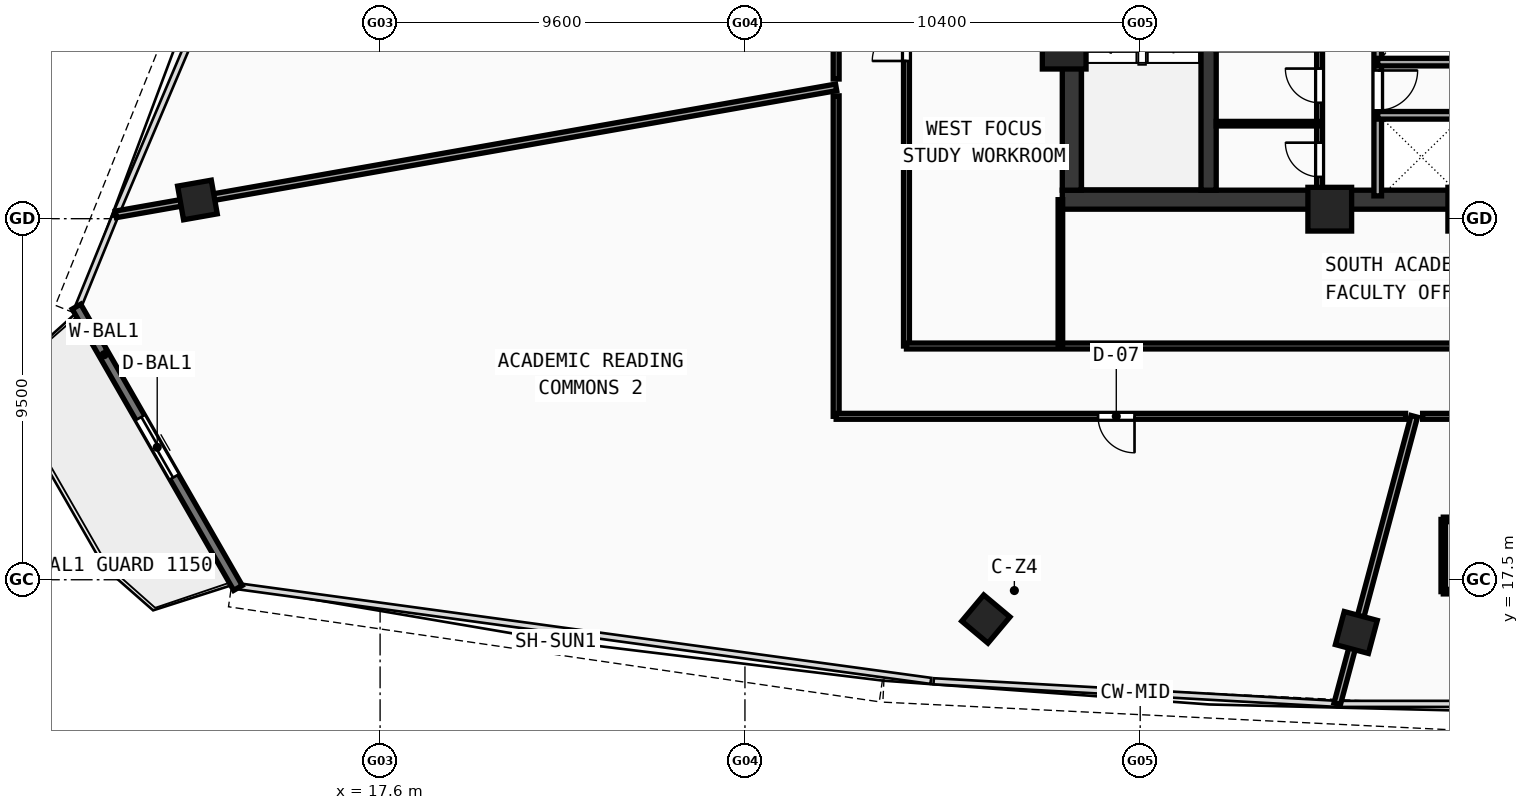
"""IFC4 building model, lengths in metres.
Left out: names, types, materials, properties, quantities, classifications, styles, units other than length and angle.
Written with IfcOpenShell. Run it as: python <this file> out.ifc"""

import sys

from ifc_helpers import new_model, si_unit, direction, frame, frame_2d, origin, origin_with_axes, origin_2d, place, context, subcontext, project, spatial, rectangle, hollow_rectangle, extrude, source, transform, mapped, element, fill, save


model = new_model("IFC4")
c1 = context("Model", 3, precision=1e-05, world=origin(), true_north=direction((0.0, 1.0)))
c2 = subcontext(c1, "Body", "Model", "MODEL_VIEW")
j1 = project(units=[si_unit("LENGTHUNIT", "METRE"), si_unit("PLANEANGLEUNIT", "RADIAN")], contexts=[c1])
p1 = place(None, origin())
s1 = spatial("IfcSite", under=j1, at=p1, CompositionType="ELEMENT")
p2 = place(p1, origin())
s2 = spatial("IfcBuilding", under=s1, at=p2, CompositionType="ELEMENT")
p3 = place(p2, frame((0.0, 0.0, 192.36)))
s3 = spatial("IfcBuildingStorey", under=s2, at=p3, CompositionType="ELEMENT", Elevation=192.36)
p4 = place(p3, frame((35.55, 27.5, 0.0), z_axis=(0.0, 0.0, 1.0), x_axis=(1.0, 0.0, 0.0)))
e1 = element("IfcWall", 1, at=p4, inside=s3, PredefinedType="SHEAR", context=c2, shape_type="SweptSolid", body=[
    extrude(rectangle(XDim=24.9, YDim=0.5, at=frame_2d((12.45, 0.0))), origin(), (0.0, 0.0, 1.0), 3.54),
])
p5 = place(p3, frame((35.8, 27.75, 0.0), z_axis=(0.0, 0.0, 1.0), x_axis=(0.0, 1.0, 0.0)))
e2 = element("IfcWall", 2, at=p5, inside=s3, PredefinedType="SHEAR", context=c2, shape_type="SweptSolid", body=[
    extrude(rectangle(XDim=12.2, YDim=0.5, at=frame_2d((6.1, 0.0))), origin(), (0.0, 0.0, 1.0), 3.54),
])
p6 = place(p3, frame((39.4, 27.75, 0.0), z_axis=(0.0, 0.0, 1.0), x_axis=(0.0, 1.0, 0.0)))
e3 = element("IfcWall", 3, at=p6, inside=s3, PredefinedType="SHEAR", context=c2, shape_type="SweptSolid", body=[
    extrude(rectangle(XDim=12.2, YDim=0.4, at=frame_2d((6.1, 0.0))), origin(), (0.0, 0.0, 1.0), 3.54),
])
p7 = place(p6, frame((10.0, 0.0, 0.0)))
e4 = element("IfcOpeningElement", 4, at=p7, cuts=e3, PredefinedType="OPENING", context=c2, shape_type="SweptSolid", body=[
    extrude(rectangle(XDim=1.1, YDim=2.1, at=frame_2d((0.55, 1.05))), frame((0.0, 0.21, 0.0), z_axis=(0.0, -1.0, 0.0), x_axis=(1.0, 0.0, 0.0)), (0.0, 0.0, 1.0), 0.42),
])
m1 = source(origin(), c2, "Body", "SweptSolid", [
    extrude(hollow_rectangle(XDim=1.15, YDim=1.15, WallThickness=0.048, at=origin_2d()), origin(), (0.0, 0.0, 1.0), 3.8),
])
for number, where, z_axis, x_axis in (
    (5, (42.588, 27.25, -0.26), (0.0, 0.0, 1.0), (1.0, 0.0, 0.0)),
    (6, (46.272, 27.25, -0.26), (0.0, 0.0, 1.0), (1.0, 0.0, 0.0)),
    (7, (35.6, 31.513, -0.26), (0.0, 0.0, 1.0), (1.0, 0.0, 0.0)),
):
    element("IfcColumn", number, at=place(p3, frame(where, z_axis=z_axis, x_axis=x_axis)), inside=s3, PredefinedType="COLUMN", context=c2, shape_type="MappedRepresentation", body=[
        mapped(m1, transform((0.0, 0.0, 0.0), scale=1.0)),
    ])
m2 = source(origin(), c2, "Body", "SweptSolid", [
    extrude(hollow_rectangle(XDim=0.9, YDim=0.9, WallThickness=0.036, at=origin_2d()), origin(), (0.0, 0.0, 1.0), 3.8),
])
for number, where, z_axis, x_axis in (
    (8, (33.539, 16.466, -0.26), (0.0, 0.0, 1.0), (0.766, -0.643, 0.0)),
    (9, (43.288, 16.112, -0.26), (0.0, 0.0, 1.0), (0.966, -0.259, 0.0)),
    (10, (12.793, 27.492, -0.26), (0.0, 0.0, 1.0), (0.174, -0.985, 0.0)),
):
    element("IfcColumn", number, at=place(p3, frame(where, z_axis=z_axis, x_axis=x_axis)), inside=s3, PredefinedType="COLUMN", context=c2, shape_type="MappedRepresentation", body=[
        mapped(m2, transform((0.0, 0.0, 0.0), scale=1.0)),
    ])
p8 = place(p3, frame((9.611, 24.686, 0.0), z_axis=(0.0, 0.0, 1.0), x_axis=(0.497930869929, -0.867216725376, 0.0)))
e11 = element("IfcWall", 11, at=p8, inside=s3, PredefinedType="STANDARD", context=c2, shape_type="SweptSolid", body=[
    extrude(rectangle(XDim=8.534, YDim=0.26, at=frame_2d((4.267, 0.0))), origin(), (0.0, 0.0, 1.0), 3.54),
])
p9 = place(p8, frame((3.367, 0.0, 0.0)))
e12 = element("IfcOpeningElement", 12, at=p9, cuts=e11, PredefinedType="OPENING", context=c2, shape_type="SweptSolid", body=[
    extrude(rectangle(XDim=1.8, YDim=2.15, at=frame_2d((0.9, 1.075))), frame((0.0, 0.14, 0.0), z_axis=(0.0, -1.0, 0.0), x_axis=(1.0, 0.0, 0.0)), (0.0, 0.0, 1.0), 0.28),
])
p10 = place(p3, frame((43.85, 27.6, 0.0), z_axis=(0.0, 0.0, 1.0), x_axis=(0.0, 1.0, 0.0)))
e13 = element("IfcWall", 13, at=p10, inside=s3, PredefinedType="SOLIDWALL", context=c2, shape_type="SweptSolid", body=[
    extrude(rectangle(XDim=6.22, YDim=0.2, at=frame_2d((3.11, 0.0))), origin(), (0.0, 0.0, 1.0), 3.54),
])
p11 = place(p10, frame((2.25, 0.0, 0.0)))
e14 = element("IfcOpeningElement", 14, at=p11, cuts=e13, PredefinedType="OPENING", context=c2, shape_type="SweptSolid", body=[
    extrude(rectangle(XDim=1.05, YDim=2.1, at=frame_2d((0.525, 1.05))), frame((0.0, 0.11, 0.0), z_axis=(0.0, -1.0, 0.0), x_axis=(1.0, 0.0, 0.0)), (0.0, 0.0, 1.0), 0.22),
])
p12 = place(p3, frame((43.85, 29.72, 0.0), z_axis=(0.0, 0.0, 1.0), x_axis=(1.0, 0.0, 0.0)))
e15 = element("IfcWall", 15, at=p12, inside=s3, PredefinedType="SOLIDWALL", context=c2, shape_type="SweptSolid", body=[
    extrude(rectangle(XDim=7.2, YDim=0.2, at=frame_2d((3.6, 0.0))), origin(), (0.0, 0.0, 1.0), 3.54),
])
p13 = place(p3, frame((43.85, 31.12, 0.0), z_axis=(0.0, 0.0, 1.0), x_axis=(1.0, 0.0, 0.0)))
e16 = element("IfcWall", 16, at=p13, inside=s3, PredefinedType="SOLIDWALL", context=c2, shape_type="SweptSolid", body=[
    extrude(rectangle(XDim=9.83, YDim=0.2, at=frame_2d((4.915, 0.0))), origin(), (0.0, 0.0, 1.0), 3.54),
])
p14 = place(p3, frame((42.32, 27.6, 0.0), z_axis=(0.0, 0.0, 1.0), x_axis=(0.0, 1.0, 0.0)))
e17 = element("IfcWall", 17, at=p14, inside=s3, PredefinedType="PARTITIONING", context=c2, shape_type="SweptSolid", body=[
    extrude(rectangle(XDim=5.9, YDim=0.155, at=frame_2d((2.95, 0.0))), origin(), (0.0, 0.0, 1.0), 3.54),
])
p15 = place(p14, frame((0.5, 0.0, 0.0)))
e18 = element("IfcOpeningElement", 18, at=p15, cuts=e17, PredefinedType="OPENING", context=c2, shape_type="SweptSolid", body=[
    extrude(rectangle(XDim=0.9, YDim=2.1, at=frame_2d((0.45, 1.05))), frame((0.0, 0.087, 0.0), z_axis=(0.0, -1.0, 0.0), x_axis=(1.0, 0.0, 0.0)), (0.0, 0.0, 1.0), 0.175),
])
p16 = place(p14, frame((2.45, 0.0, 0.0)))
e19 = element("IfcOpeningElement", 19, at=p16, cuts=e17, PredefinedType="OPENING", context=c2, shape_type="SweptSolid", body=[
    extrude(rectangle(XDim=0.9, YDim=2.1, at=frame_2d((0.45, 1.05))), frame((0.0, 0.087, 0.0), z_axis=(0.0, -1.0, 0.0), x_axis=(1.0, 0.0, 0.0)), (0.0, 0.0, 1.0), 0.175),
])
p17 = place(p14, frame((4.42, 0.0, 0.0)))
e20 = element("IfcOpeningElement", 20, at=p17, cuts=e17, PredefinedType="OPENING", context=c2, shape_type="SweptSolid", body=[
    extrude(rectangle(XDim=0.94, YDim=2.1, at=frame_2d((0.47, 1.05))), frame((0.0, 0.087, 0.0), z_axis=(0.0, -1.0, 0.0), x_axis=(1.0, 0.0, 0.0)), (0.0, 0.0, 1.0), 0.175),
])
p18 = place(p3, frame((39.6, 29.5, 0.0), z_axis=(0.0, 0.0, 1.0), x_axis=(1.0, 0.0, 0.0)))
e21 = element("IfcWall", 21, at=p18, inside=s3, PredefinedType="PARTITIONING", context=c2, shape_type="SweptSolid", body=[
    extrude(rectangle(XDim=2.72, YDim=0.12, at=frame_2d((1.36, 0.0))), origin(), (0.0, 0.0, 1.0), 3.54),
])
p19 = place(p3, frame((31.45, 23.65, 0.0), z_axis=(0.0, 0.0, 1.0), x_axis=(0.0, 1.0, 0.0)))
e22 = element("IfcWall", 22, at=p19, inside=s3, PredefinedType="PARTITIONING", context=c2, shape_type="SweptSolid", body=[
    extrude(rectangle(XDim=16.6, YDim=0.155, at=frame_2d((8.3, 0.0))), origin(), (0.0, 0.0, 1.0), 2.89),
])
p20 = place(p19, frame((7.5, 0.0, 0.0)))
e23 = element("IfcOpeningElement", 23, at=p20, cuts=e22, PredefinedType="OPENING", context=c2, shape_type="SweptSolid", body=[
    extrude(rectangle(XDim=0.9, YDim=2.08, at=frame_2d((0.45, 1.04))), frame((0.0, 0.087, 0.0), z_axis=(0.0, -1.0, 0.0), x_axis=(1.0, 0.0, 0.0)), (0.0, 0.0, 1.0), 0.175),
])
p21 = place(p3, frame((31.45, 23.65, 0.0), z_axis=(0.0, 0.0, 1.0), x_axis=(1.0, 0.0, 0.0)))
e24 = element("IfcWall", 24, at=p21, inside=s3, PredefinedType="PARTITIONING", context=c2, shape_type="SweptSolid", body=[
    extrude(rectangle(XDim=33.1, YDim=0.155, at=frame_2d((16.55, 0.0))), origin(), (0.0, 0.0, 1.0), 2.89),
])
p22 = place(p21, frame((16.0, 0.0, 0.0)))
e25 = element("IfcOpeningElement", 25, at=p22, cuts=e24, PredefinedType="OPENING", context=c2, shape_type="SweptSolid", body=[
    extrude(rectangle(XDim=0.92, YDim=2.1, at=frame_2d((0.46, 1.05))), frame((0.0, 0.087, 0.0), z_axis=(0.0, -1.0, 0.0), x_axis=(1.0, 0.0, 0.0)), (0.0, 0.0, 1.0), 0.175),
])
p23 = place(p3, frame((35.5, 23.65, 0.0), z_axis=(0.0, 0.0, 1.0), x_axis=(0.0, 1.0, 0.0)))
e26 = element("IfcWall", 26, at=p23, inside=s3, PredefinedType="PARTITIONING", context=c2, shape_type="SweptSolid", body=[
    extrude(rectangle(XDim=3.85, YDim=0.12, at=frame_2d((1.925, 0.0))), origin(), (0.0, 0.0, 1.0), 3.14),
])
p24 = place(p3, frame((29.6, 30.456, 0.0), z_axis=(0.0, 0.0, 1.0), x_axis=(-0.984807685374, -0.173648561263, 0.0)))
e27 = element("IfcWall", 27, at=p24, inside=s3, PredefinedType="PARTITIONING", context=c2, shape_type="SweptSolid", body=[
    extrude(rectangle(XDim=19.246, YDim=0.175, at=frame_2d((9.623, 0.0))), origin(), (0.0, 0.0, 1.0), 2.89),
])
p25 = place(p3, frame((44.811, 21.8, 0.0), z_axis=(0.0, 0.0, 1.0), x_axis=(-0.258810863021, -0.965928018634, 0.0)))
e28 = element("IfcWall", 28, at=p25, inside=s3, PredefinedType="PARTITIONING", context=c2, shape_type="SweptSolid", body=[
    extrude(rectangle(XDim=7.833, YDim=0.175, at=frame_2d((3.917, 0.0))), origin(), (0.0, 0.0, 1.0), 2.89),
])
p26 = place(p3, frame((29.6, 21.8, 0.0), z_axis=(0.0, 0.0, 1.0), x_axis=(0.0, 1.0, 0.0)))
e29 = element("IfcWall", 29, at=p26, inside=s3, PredefinedType="PARTITIONING", context=c2, shape_type="SweptSolid", body=[
    extrude(rectangle(XDim=8.432, YDim=0.155, at=frame_2d((4.216, 0.0))), origin(), (0.0, 0.0, 1.0), 3.14),
])
p27 = place(p3, frame((29.6, 30.675, 0.0), z_axis=(0.0, 0.0, 1.0), x_axis=(0.0, 1.0, 0.0)))
e30 = element("IfcWall", 30, at=p27, inside=s3, PredefinedType="PARTITIONING", context=c2, shape_type="SweptSolid", body=[
    extrude(rectangle(XDim=8.783, YDim=0.155, at=frame_2d((4.392, 0.0))), origin(), (0.0, 0.0, 1.0), 3.14),
])
p28 = place(p27, frame((3.932, 0.0, 0.0)))
e31 = element("IfcOpeningElement", 31, at=p28, cuts=e30, PredefinedType="OPENING", context=c2, shape_type="SweptSolid", body=[
    extrude(rectangle(XDim=0.92, YDim=2.1, at=frame_2d((0.46, 1.05))), frame((0.0, 0.087, 0.0), z_axis=(0.0, -1.0, 0.0), x_axis=(1.0, 0.0, 0.0)), (0.0, 0.0, 1.0), 0.175),
])
p29 = place(p3, frame((50.969, 21.8, 0.0), z_axis=(0.0, 0.0, 1.0), x_axis=(-1.0, 0.0, 0.0)))
e32 = element("IfcWall", 32, at=p29, inside=s3, PredefinedType="PARTITIONING", context=c2, shape_type="SweptSolid", body=[
    extrude(rectangle(XDim=5.938, YDim=0.155, at=frame_2d((2.969, 0.0))), origin(), (0.0, 0.0, 1.0), 3.54),
])
p30 = place(p29, frame((2.494, 0.0, 0.0)))
e33 = element("IfcOpeningElement", 33, at=p30, cuts=e32, PredefinedType="OPENING", context=c2, shape_type="SweptSolid", body=[
    extrude(rectangle(XDim=0.96, YDim=2.12, at=frame_2d((0.48, 1.06))), frame((0.0, 0.087, 0.0), z_axis=(0.0, -1.0, 0.0), x_axis=(1.0, 0.0, 0.0)), (0.0, 0.0, 1.0), 0.175),
])
p31 = place(p3, frame((44.583, 21.8, 0.0), z_axis=(0.0, 0.0, 1.0), x_axis=(-1.0, 0.0, 0.0)))
e34 = element("IfcWall", 34, at=p31, inside=s3, PredefinedType="PARTITIONING", context=c2, shape_type="SweptSolid", body=[
    extrude(rectangle(XDim=14.983, YDim=0.155, at=frame_2d((7.492, 0.0))), origin(), (0.0, 0.0, 1.0), 2.89),
])
p32 = place(p31, frame((7.133, 0.0, 0.0)))
e35 = element("IfcOpeningElement", 35, at=p32, cuts=e34, PredefinedType="OPENING", context=c2, shape_type="SweptSolid", body=[
    extrude(rectangle(XDim=0.96, YDim=2.12, at=frame_2d((0.48, 1.06))), frame((0.0, 0.087, 0.0), z_axis=(0.0, -1.0, 0.0), x_axis=(1.0, 0.0, 0.0)), (0.0, 0.0, 1.0), 0.175),
])
p33 = place(p3, frame((45.575, 17.187, 0.0), z_axis=(0.0, 0.0, 1.0), x_axis=(1.0, 0.0, 0.0)))
e36 = element("IfcWall", 36, at=p33, inside=s3, PredefinedType="PARTITIONING", context=c2, shape_type="SweptSolid", body=[
    extrude(rectangle(XDim=2.05, YDim=0.12, at=frame_2d((1.025, 0.0))), origin(), (0.0, 0.0, 1.0), 3.54),
])
p34 = place(p33, frame((0.6, 0.0, 0.0)))
e37 = element("IfcOpeningElement", 37, at=p34, cuts=e36, PredefinedType="OPENING", context=c2, shape_type="SweptSolid", body=[
    extrude(rectangle(XDim=0.85, YDim=2.1, at=frame_2d((0.425, 1.05))), frame((0.0, 0.07, 0.0), z_axis=(0.0, -1.0, 0.0), x_axis=(1.0, 0.0, 0.0)), (0.0, 0.0, 1.0), 0.14),
])
p35 = place(p3, frame((47.625, 19.087, 0.0), z_axis=(0.0, 0.0, 1.0), x_axis=(-1.0, 0.0, 0.0)))
e38 = element("IfcWall", 38, at=p35, inside=s3, PredefinedType="PARTITIONING", context=c2, shape_type="SweptSolid", body=[
    extrude(rectangle(XDim=2.05, YDim=0.12, at=frame_2d((1.025, 0.0))), origin(), (0.0, 0.0, 1.0), 3.54),
])
p36 = place(p3, frame((45.575, 19.087, 0.0), z_axis=(0.0, 0.0, 1.0), x_axis=(0.0, -1.0, 0.0)))
e39 = element("IfcWall", 39, at=p36, inside=s3, PredefinedType="PARTITIONING", context=c2, shape_type="SweptSolid", body=[
    extrude(rectangle(XDim=1.9, YDim=0.12, at=frame_2d((0.95, 0.0))), origin(), (0.0, 0.0, 1.0), 3.54),
])
m3 = source(origin(), c2, "Body", "SweptSolid", [
    extrude(rectangle(XDim=1.8, YDim=2.15, at=frame_2d((0.9, 1.075))), frame((0.0, 0.025, 0.0), z_axis=(0.0, -1.0, 0.0), x_axis=(1.0, 0.0, 0.0)), (0.0, 0.0, 1.0), 0.05),
])
p37 = place(p9, origin_with_axes())
e40 = element("IfcDoor", 40, at=p37, inside=s3, OperationType="DOUBLE_DOOR_SLIDING", PredefinedType="DOOR", context=c2, shape_type="MappedRepresentation", body=[
    mapped(m3, transform((0.0, 0.0, 0.0), scale=1.0)),
])
fill(e12, e40)
m4 = source(origin(), c2, "Body", "SweptSolid", [
    extrude(rectangle(XDim=1.05, YDim=2.1, at=frame_2d((0.525, 1.05))), frame((0.0, 0.025, 0.0), z_axis=(0.0, -1.0, 0.0), x_axis=(1.0, 0.0, 0.0)), (0.0, 0.0, 1.0), 0.05),
])
p38 = place(p11, frame((1.05, 0.0, 0.0), z_axis=(0.0, 0.0, 1.0), x_axis=(-1.0, 0.0, 0.0)))
e41 = element("IfcDoor", 41, at=p38, inside=s3, OperationType="SINGLE_SWING_LEFT", PredefinedType="DOOR", context=c2, shape_type="MappedRepresentation", body=[
    mapped(m4, transform((0.0, 0.0, 0.0), scale=1.0)),
])
fill(e14, e41)
m5 = source(origin(), c2, "Body", "SweptSolid", [
    extrude(rectangle(XDim=0.9, YDim=2.1, at=frame_2d((0.45, 1.05))), frame((0.0, 0.025, 0.0), z_axis=(0.0, -1.0, 0.0), x_axis=(1.0, 0.0, 0.0)), (0.0, 0.0, 1.0), 0.05),
])
p39 = place(p15, origin_with_axes())
e42 = element("IfcDoor", 42, at=p39, inside=s3, OperationType="SINGLE_SWING_RIGHT", PredefinedType="DOOR", context=c2, shape_type="MappedRepresentation", body=[
    mapped(m5, transform((0.0, 0.0, 0.0), scale=1.0)),
])
fill(e18, e42)
p40 = place(p16, origin_with_axes())
e43 = element("IfcDoor", 43, at=p40, inside=s3, OperationType="SINGLE_SWING_RIGHT", PredefinedType="DOOR", context=c2, shape_type="MappedRepresentation", body=[
    mapped(m5, transform((0.0, 0.0, 0.0), scale=1.0)),
])
fill(e19, e43)
m6 = source(origin(), c2, "Body", "SweptSolid", [
    extrude(rectangle(XDim=0.9, YDim=2.08, at=frame_2d((0.45, 1.04))), frame((0.0, 0.025, 0.0), z_axis=(0.0, -1.0, 0.0), x_axis=(1.0, 0.0, 0.0)), (0.0, 0.0, 1.0), 0.05),
])
p41 = place(p20, origin_with_axes())
e44 = element("IfcDoor", 44, at=p41, inside=s3, OperationType="SINGLE_SWING_LEFT", PredefinedType="DOOR", context=c2, shape_type="MappedRepresentation", body=[
    mapped(m6, transform((0.0, 0.0, 0.0), scale=1.0)),
])
fill(e23, e44)
m7 = source(origin(), c2, "Body", "SweptSolid", [
    extrude(rectangle(XDim=0.96, YDim=2.12, at=frame_2d((0.48, 1.06))), frame((0.0, 0.025, 0.0), z_axis=(0.0, -1.0, 0.0), x_axis=(1.0, 0.0, 0.0)), (0.0, 0.0, 1.0), 0.05),
])
p42 = place(p32, origin_with_axes())
e45 = element("IfcDoor", 45, at=p42, inside=s3, OperationType="SINGLE_SWING_LEFT", PredefinedType="DOOR", context=c2, shape_type="MappedRepresentation", body=[
    mapped(m7, transform((0.0, 0.0, 0.0), scale=1.0)),
])
fill(e35, e45)
save(model, sys.argv[1])
